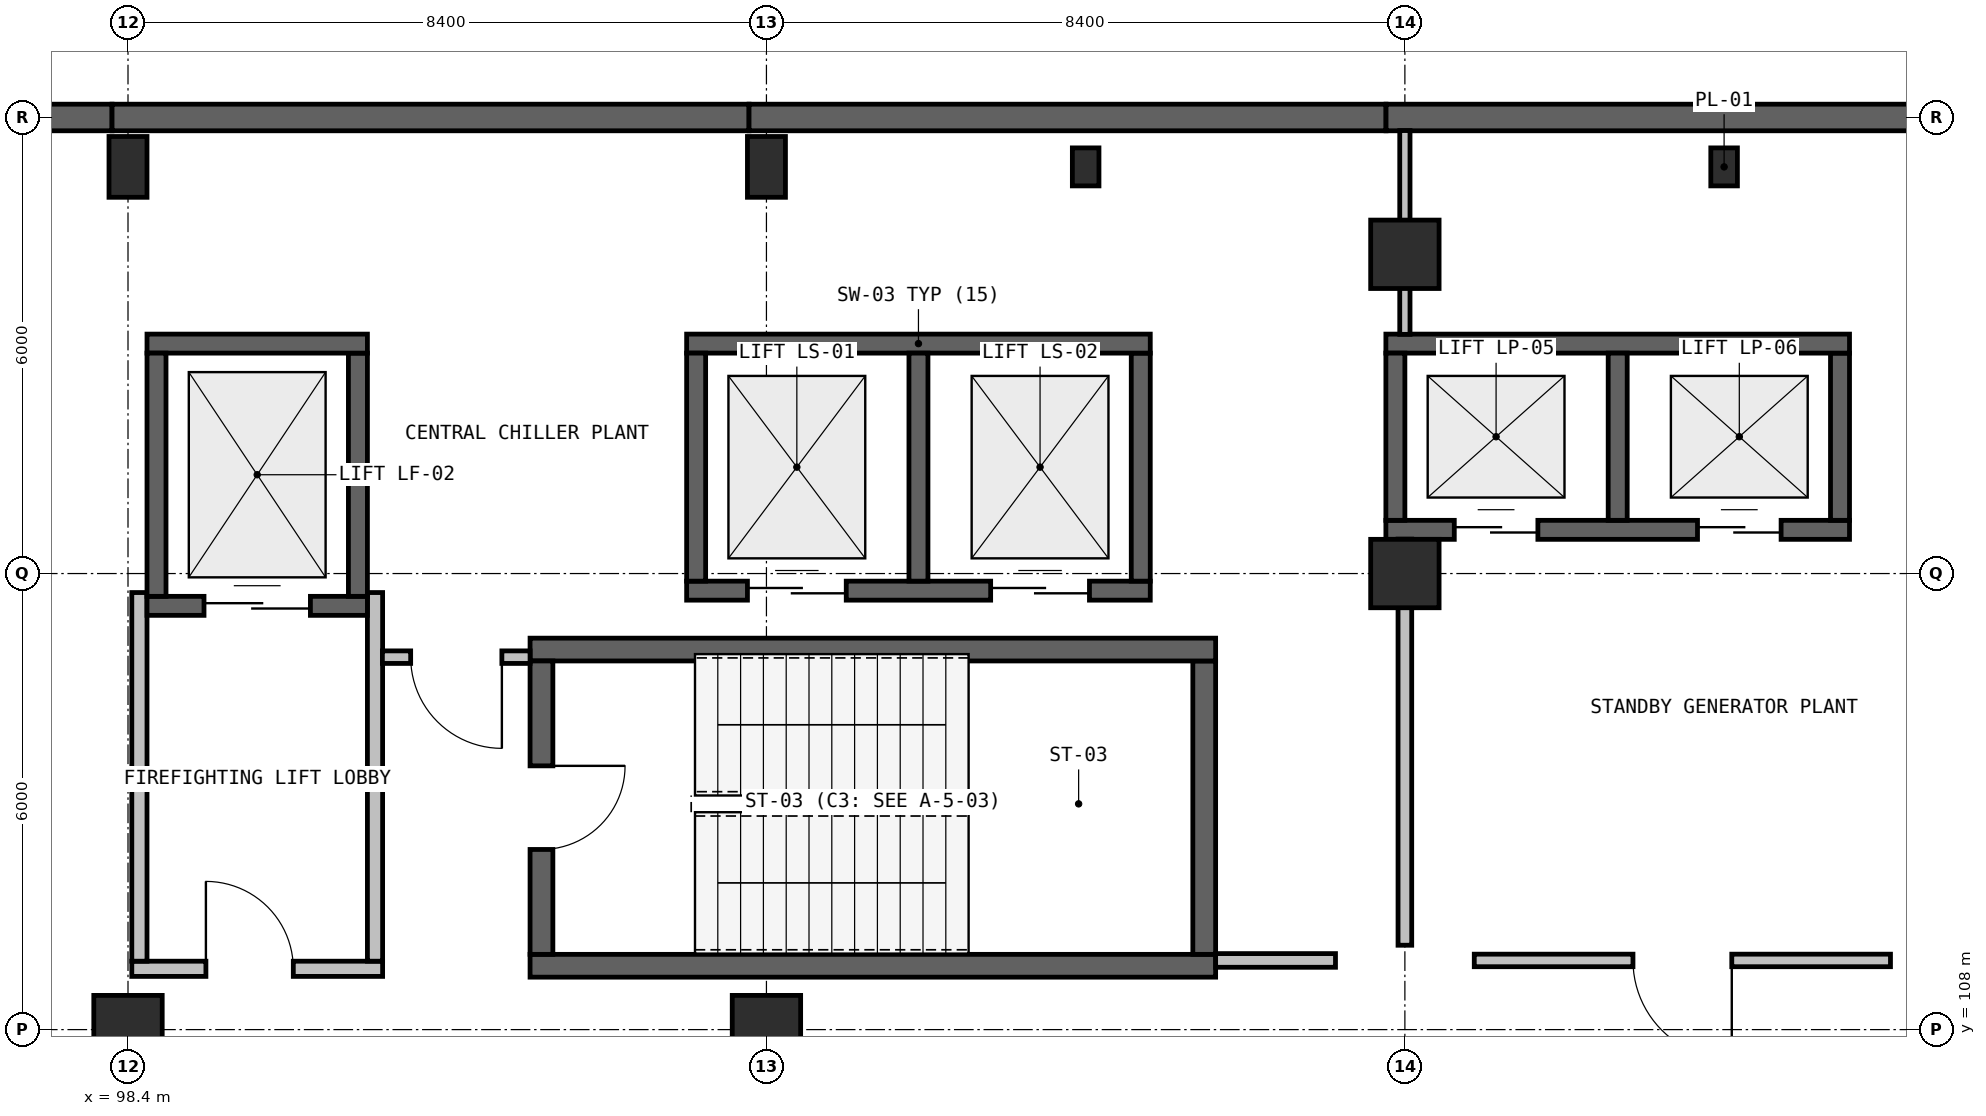
"""IFC4 building model, lengths in metres.
Left out: names, types, materials, properties, quantities, classifications, styles, units other than length and angle.
Written with IfcOpenShell. Run it as: python <this file> out.ifc"""

import sys

from ifc_helpers import new_model, si_unit, direction, frame, frame_2d, origin, origin_2d, place, context, subcontext, project, spatial, rectangle, extrude, element, fill, save


model = new_model("IFC4")
c1 = context("Model", 3, precision=1e-05, world=origin(), true_north=direction((0.0, 1.0)))
c2 = subcontext(c1, "Body", "Model", "MODEL_VIEW")
j1 = project(units=[si_unit("LENGTHUNIT", "METRE"), si_unit("PLANEANGLEUNIT", "RADIAN")], contexts=[c1])
p1 = place(None, origin())
s1 = spatial("IfcSite", under=j1, at=p1, CompositionType="ELEMENT")
p2 = place(p1, origin())
s2 = spatial("IfcBuilding", under=s1, at=p2, CompositionType="ELEMENT")
p3 = place(p2, frame((0.0, 0.0, -4.8)))
s3 = spatial("IfcBuildingStorey", under=s2, at=p3, CompositionType="ELEMENT", Elevation=-4.8)
for number, where, z_axis, x_axis in (
    (1, (115.2, 118.2, 0.0), (0.0, 0.0, 1.0), (1.0, 0.0, 0.0)),
    (2, (98.4, 108.0, 0.0), (0.0, 0.0, 1.0), (1.0, 0.0, 0.0)),
):
    element("IfcColumn", number, at=place(p3, frame(where, z_axis=z_axis, x_axis=x_axis)), inside=s3, PredefinedType="COLUMN", context=c2, shape_type="SweptSolid", body=[
        extrude(rectangle(XDim=0.9, YDim=0.9, at=origin_2d()), origin(), (0.0, 0.0, 1.0), 4.8),
    ])
p4 = place(p3, frame((98.4, 119.35, 0.0), z_axis=(0.0, 0.0, 1.0), x_axis=(1.0, 0.0, 0.0)))
e3 = element("IfcColumn", 3, at=p4, inside=s3, PredefinedType="COLUMN", context=c2, shape_type="SweptSolid", body=[
    extrude(rectangle(XDim=0.5, YDim=0.8, at=origin_2d()), origin(), (0.0, 0.0, 1.0), 4.8),
])
p5 = place(p3, frame((106.8, 108.0, 0.0), z_axis=(0.0, 0.0, 1.0), x_axis=(1.0, 0.0, 0.0)))
e4 = element("IfcColumn", 4, at=p5, inside=s3, PredefinedType="COLUMN", context=c2, shape_type="SweptSolid", body=[
    extrude(rectangle(XDim=0.9, YDim=0.9, at=origin_2d()), origin(), (0.0, 0.0, 1.0), 4.8),
])
p6 = place(p3, frame((106.8, 119.35, 0.0), z_axis=(0.0, 0.0, 1.0), x_axis=(1.0, 0.0, 0.0)))
e5 = element("IfcColumn", 5, at=p6, inside=s3, PredefinedType="COLUMN", context=c2, shape_type="SweptSolid", body=[
    extrude(rectangle(XDim=0.5, YDim=0.8, at=origin_2d()), origin(), (0.0, 0.0, 1.0), 4.8),
])
p7 = place(p3, frame((115.2, 114.0, 0.0), z_axis=(0.0, 0.0, 1.0), x_axis=(1.0, 0.0, 0.0)))
e6 = element("IfcColumn", 6, at=p7, inside=s3, PredefinedType="COLUMN", context=c2, shape_type="SweptSolid", body=[
    extrude(rectangle(XDim=0.9, YDim=0.9, at=origin_2d()), origin(), (0.0, 0.0, 1.0), 4.8),
])
for number, where, z_axis, x_axis in (
    (7, (111.0, 119.35, 0.0), (0.0, 0.0, 1.0), (1.0, 0.0, 0.0)),
    (8, (119.4, 119.35, 0.0), (0.0, 0.0, 1.0), (1.0, 0.0, 0.0)),
):
    element("IfcColumn", number, at=place(p3, frame(where, z_axis=z_axis, x_axis=x_axis)), inside=s3, PredefinedType="PILASTER", context=c2, shape_type="SweptSolid", body=[
        extrude(rectangle(XDim=0.35, YDim=0.5, at=origin_2d()), origin(), (0.0, 0.0, 1.0), 4.8),
    ])
p8 = place(p3, frame((89.809, 119.999, 0.0), z_axis=(0.0, 0.0, 1.0), x_axis=(0.999999993211, 0.000116522954, 0.0)))
e9 = element("IfcWall", 9, at=p8, inside=s3, PredefinedType="SHEAR", context=c2, shape_type="SweptSolid", body=[
    extrude(rectangle(XDim=8.381, YDim=0.35, at=frame_2d((4.19, 0.0))), origin(), (0.0, 0.0, 1.0), 4.45),
])
p9 = place(p3, frame((98.19, 120.0, 0.0), z_axis=(0.0, 0.0, 1.0), x_axis=(1.0, 0.0, 0.0)))
e10 = element("IfcWall", 10, at=p9, inside=s3, PredefinedType="SHEAR", context=c2, shape_type="SweptSolid", body=[
    extrude(rectangle(XDim=8.381, YDim=0.35, at=frame_2d((4.19, 0.0))), origin(), (0.0, 0.0, 1.0), 4.45),
])
p10 = place(p3, frame((106.571, 120.0, 0.0), z_axis=(0.0, 0.0, 1.0), x_axis=(1.0, 0.0, 0.0)))
e11 = element("IfcWall", 11, at=p10, inside=s3, PredefinedType="SHEAR", context=c2, shape_type="SweptSolid", body=[
    extrude(rectangle(XDim=8.381, YDim=0.35, at=frame_2d((4.19, 0.0))), origin(), (0.0, 0.0, 1.0), 4.45),
])
p11 = place(p3, frame((114.952, 120.0, 0.0), z_axis=(0.0, 0.0, 1.0), x_axis=(1.0, 0.0, 0.0)))
e12 = element("IfcWall", 12, at=p11, inside=s3, PredefinedType="SHEAR", context=c2, shape_type="SweptSolid", body=[
    extrude(rectangle(XDim=8.381, YDim=0.35, at=frame_2d((4.19, 0.0))), origin(), (0.0, 0.0, 1.0), 4.45),
])
p12 = place(p3, frame((98.45, 108.8, 0.0), z_axis=(0.0, 0.0, 1.0), x_axis=(1.0, 0.0, 0.0)))
e13 = element("IfcWall", 13, at=p12, inside=s3, PredefinedType="SOLIDWALL", context=c2, shape_type="SweptSolid", body=[
    extrude(rectangle(XDim=3.3, YDim=0.2, at=frame_2d((1.65, 0.0))), origin(), (0.0, 0.0, 1.0), 4.45),
])
p13 = place(p12, frame((0.975, 0.0, 0.0)))
e14 = element("IfcOpeningElement", 14, at=p13, cuts=e13, PredefinedType="OPENING", context=c2, shape_type="SweptSolid", body=[
    extrude(rectangle(XDim=1.15, YDim=2.15, at=frame_2d((0.575, 1.075))), frame((0.0, 0.11, 0.0), z_axis=(0.0, -1.0, 0.0), x_axis=(1.0, 0.0, 0.0)), (0.0, 0.0, 1.0), 0.22),
])
p14 = place(p3, frame((101.65, 108.9, 0.0), z_axis=(0.0, 0.0, 1.0), x_axis=(0.0, 1.0, 0.0)))
e15 = element("IfcWall", 15, at=p14, inside=s3, PredefinedType="SOLIDWALL", context=c2, shape_type="SweptSolid", body=[
    extrude(rectangle(XDim=4.85, YDim=0.2, at=frame_2d((2.425, 0.0))), origin(), (0.0, 0.0, 1.0), 4.45),
])
p15 = place(p3, frame((98.55, 113.75, 0.0), z_axis=(0.0, 0.0, 1.0), x_axis=(0.0, -1.0, 0.0)))
e16 = element("IfcWall", 16, at=p15, inside=s3, PredefinedType="SOLIDWALL", context=c2, shape_type="SweptSolid", body=[
    extrude(rectangle(XDim=4.85, YDim=0.2, at=frame_2d((2.425, 0.0))), origin(), (0.0, 0.0, 1.0), 3.7),
])
p16 = place(p3, frame((103.69, 108.84, 0.0), z_axis=(0.0, 0.0, 1.0), x_axis=(1.0, 0.0, 0.0)))
e17 = element("IfcWall", 17, at=p16, inside=s3, PredefinedType="SHEAR", context=c2, shape_type="SweptSolid", body=[
    extrude(rectangle(XDim=9.02, YDim=0.3, at=frame_2d((4.51, 0.0))), origin(), (0.0, 0.0, 1.0), 4.45),
])
p17 = place(p3, frame((112.56, 108.99, 0.0), z_axis=(0.0, 0.0, 1.0), x_axis=(0.0, 1.0, 0.0)))
e18 = element("IfcWall", 18, at=p17, inside=s3, PredefinedType="SHEAR", context=c2, shape_type="SweptSolid", body=[
    extrude(rectangle(XDim=3.86, YDim=0.3, at=frame_2d((1.93, 0.0))), origin(), (0.0, 0.0, 1.0), 4.45),
])
p18 = place(p3, frame((112.71, 113.0, 0.0), z_axis=(0.0, 0.0, 1.0), x_axis=(-1.0, 0.0, 0.0)))
e19 = element("IfcWall", 19, at=p18, inside=s3, PredefinedType="SHEAR", context=c2, shape_type="SweptSolid", body=[
    extrude(rectangle(XDim=9.02, YDim=0.3, at=frame_2d((4.51, 0.0))), origin(), (0.0, 0.0, 1.0), 4.45),
])
p19 = place(p3, frame((103.84, 112.85, 0.0), z_axis=(0.0, 0.0, 1.0), x_axis=(0.0, -1.0, 0.0)))
e20 = element("IfcWall", 20, at=p19, inside=s3, PredefinedType="SHEAR", context=c2, shape_type="SweptSolid", body=[
    extrude(rectangle(XDim=3.86, YDim=0.3, at=frame_2d((1.93, 0.0))), origin(), (0.0, 0.0, 1.0), 4.45),
])
p20 = place(p19, frame((1.38, 0.0, 0.0)))
e21 = element("IfcOpeningElement", 21, at=p20, cuts=e20, PredefinedType="OPENING", context=c2, shape_type="SweptSolid", body=[
    extrude(rectangle(XDim=1.1, YDim=2.15, at=frame_2d((0.55, 1.075))), frame((0.0, 0.16, 0.0), z_axis=(0.0, -1.0, 0.0), x_axis=(1.0, 0.0, 0.0)), (0.0, 0.0, 1.0), 0.32),
])
p21 = place(p3, frame((98.65, 113.575, 0.0), z_axis=(0.0, 0.0, 1.0), x_axis=(1.0, 0.0, 0.0)))
e22 = element("IfcWall", 22, at=p21, inside=s3, PredefinedType="SHEAR", context=c2, shape_type="SweptSolid", body=[
    extrude(rectangle(XDim=2.9, YDim=0.25, at=frame_2d((1.45, 0.0))), origin(), (0.0, 0.0, 1.0), 4.45),
])
p22 = place(p21, frame((0.75, 0.0, 0.0)))
e23 = element("IfcOpeningElement", 23, at=p22, cuts=e22, PredefinedType="OPENING", context=c2, shape_type="SweptSolid", body=[
    extrude(rectangle(XDim=1.4, YDim=2.15, at=frame_2d((0.7, 1.075))), frame((0.0, 0.135, 0.0), z_axis=(0.0, -1.0, 0.0), x_axis=(1.0, 0.0, 0.0)), (0.0, 0.0, 1.0), 0.27),
])
p23 = place(p3, frame((101.425, 113.7, 0.0), z_axis=(0.0, 0.0, 1.0), x_axis=(0.0, 1.0, 0.0)))
e24 = element("IfcWall", 24, at=p23, inside=s3, PredefinedType="SHEAR", context=c2, shape_type="SweptSolid", body=[
    extrude(rectangle(XDim=3.2, YDim=0.25, at=frame_2d((1.6, 0.0))), origin(), (0.0, 0.0, 1.0), 4.45),
])
p24 = place(p3, frame((101.55, 117.025, 0.0), z_axis=(0.0, 0.0, 1.0), x_axis=(-1.0, 0.0, 0.0)))
e25 = element("IfcWall", 25, at=p24, inside=s3, PredefinedType="SHEAR", context=c2, shape_type="SweptSolid", body=[
    extrude(rectangle(XDim=2.9, YDim=0.25, at=frame_2d((1.45, 0.0))), origin(), (0.0, 0.0, 1.0), 4.45),
])
p25 = place(p3, frame((98.775, 116.9, 0.0), z_axis=(0.0, 0.0, 1.0), x_axis=(0.0, -1.0, 0.0)))
e26 = element("IfcWall", 26, at=p25, inside=s3, PredefinedType="SHEAR", context=c2, shape_type="SweptSolid", body=[
    extrude(rectangle(XDim=3.2, YDim=0.25, at=frame_2d((1.6, 0.0))), origin(), (0.0, 0.0, 1.0), 4.45),
])
p26 = place(p3, frame((105.75, 113.775, 0.0), z_axis=(0.0, 0.0, 1.0), x_axis=(1.0, 0.0, 0.0)))
e27 = element("IfcWall", 27, at=p26, inside=s3, PredefinedType="SHEAR", context=c2, shape_type="SweptSolid", body=[
    extrude(rectangle(XDim=6.1, YDim=0.25, at=frame_2d((3.05, 0.0))), origin(), (0.0, 0.0, 1.0), 4.45),
])
p27 = place(p26, frame((0.8, 0.0, 0.0)))
e28 = element("IfcOpeningElement", 28, at=p27, cuts=e27, PredefinedType="OPENING", context=c2, shape_type="SweptSolid", body=[
    extrude(rectangle(XDim=1.3, YDim=2.15, at=frame_2d((0.65, 1.075))), frame((0.0, 0.135, 0.0), z_axis=(0.0, -1.0, 0.0), x_axis=(1.0, 0.0, 0.0)), (0.0, 0.0, 1.0), 0.27),
])
p28 = place(p26, frame((4.0, 0.0, 0.0)))
e29 = element("IfcOpeningElement", 29, at=p28, cuts=e27, PredefinedType="OPENING", context=c2, shape_type="SweptSolid", body=[
    extrude(rectangle(XDim=1.3, YDim=2.15, at=frame_2d((0.65, 1.075))), frame((0.0, 0.135, 0.0), z_axis=(0.0, -1.0, 0.0), x_axis=(1.0, 0.0, 0.0)), (0.0, 0.0, 1.0), 0.27),
])
p29 = place(p3, frame((111.725, 113.9, 0.0), z_axis=(0.0, 0.0, 1.0), x_axis=(0.0, 1.0, 0.0)))
e30 = element("IfcWall", 30, at=p29, inside=s3, PredefinedType="SHEAR", context=c2, shape_type="SweptSolid", body=[
    extrude(rectangle(XDim=3.0, YDim=0.25, at=frame_2d((1.5, 0.0))), origin(), (0.0, 0.0, 1.0), 4.45),
])
p30 = place(p3, frame((111.85, 117.025, 0.0), z_axis=(0.0, 0.0, 1.0), x_axis=(-1.0, 0.0, 0.0)))
e31 = element("IfcWall", 31, at=p30, inside=s3, PredefinedType="SHEAR", context=c2, shape_type="SweptSolid", body=[
    extrude(rectangle(XDim=6.1, YDim=0.25, at=frame_2d((3.05, 0.0))), origin(), (0.0, 0.0, 1.0), 4.45),
])
for number, where, z_axis, x_axis in (
    (32, (105.875, 116.9, 0.0), (0.0, 0.0, 1.0), (0.0, -1.0, 0.0)),
    (33, (108.8, 113.9, 0.0), (0.0, 0.0, 1.0), (0.0, 1.0, 0.0)),
):
    element("IfcWall", number, at=place(p3, frame(where, z_axis=z_axis, x_axis=x_axis)), inside=s3, PredefinedType="SHEAR", context=c2, shape_type="SweptSolid", body=[
        extrude(rectangle(XDim=3.0, YDim=0.25, at=frame_2d((1.5, 0.0))), origin(), (0.0, 0.0, 1.0), 4.45),
    ])
p31 = place(p3, frame((114.95, 114.575, 0.0), z_axis=(0.0, 0.0, 1.0), x_axis=(1.0, 0.0, 0.0)))
e34 = element("IfcWall", 34, at=p31, inside=s3, PredefinedType="SHEAR", context=c2, shape_type="SweptSolid", body=[
    extrude(rectangle(XDim=6.1, YDim=0.25, at=frame_2d((3.05, 0.0))), origin(), (0.0, 0.0, 1.0), 4.45),
])
p32 = place(p31, frame((0.9, 0.0, 0.0)))
e35 = element("IfcOpeningElement", 35, at=p32, cuts=e34, PredefinedType="OPENING", context=c2, shape_type="SweptSolid", body=[
    extrude(rectangle(XDim=1.1, YDim=2.15, at=frame_2d((0.55, 1.075))), frame((0.0, 0.135, 0.0), z_axis=(0.0, -1.0, 0.0), x_axis=(1.0, 0.0, 0.0)), (0.0, 0.0, 1.0), 0.27),
])
p33 = place(p31, frame((4.1, 0.0, 0.0)))
e36 = element("IfcOpeningElement", 36, at=p33, cuts=e34, PredefinedType="OPENING", context=c2, shape_type="SweptSolid", body=[
    extrude(rectangle(XDim=1.1, YDim=2.15, at=frame_2d((0.55, 1.075))), frame((0.0, 0.135, 0.0), z_axis=(0.0, -1.0, 0.0), x_axis=(1.0, 0.0, 0.0)), (0.0, 0.0, 1.0), 0.27),
])
p34 = place(p3, frame((120.925, 114.7, 0.0), z_axis=(0.0, 0.0, 1.0), x_axis=(0.0, 1.0, 0.0)))
e37 = element("IfcWall", 37, at=p34, inside=s3, PredefinedType="SHEAR", context=c2, shape_type="SweptSolid", body=[
    extrude(rectangle(XDim=2.2, YDim=0.25, at=frame_2d((1.1, 0.0))), origin(), (0.0, 0.0, 1.0), 4.45),
])
p35 = place(p3, frame((121.05, 117.025, 0.0), z_axis=(0.0, 0.0, 1.0), x_axis=(-1.0, 0.0, 0.0)))
e38 = element("IfcWall", 38, at=p35, inside=s3, PredefinedType="SHEAR", context=c2, shape_type="SweptSolid", body=[
    extrude(rectangle(XDim=6.1, YDim=0.25, at=frame_2d((3.05, 0.0))), origin(), (0.0, 0.0, 1.0), 4.45),
])
for number, where, z_axis, x_axis in (
    (39, (115.075, 116.9, 0.0), (0.0, 0.0, 1.0), (0.0, -1.0, 0.0)),
    (40, (118.0, 114.7, 0.0), (0.0, 0.0, 1.0), (0.0, 1.0, 0.0)),
):
    element("IfcWall", number, at=place(p3, frame(where, z_axis=z_axis, x_axis=x_axis)), inside=s3, PredefinedType="SHEAR", context=c2, shape_type="SweptSolid", body=[
        extrude(rectangle(XDim=2.2, YDim=0.25, at=frame_2d((1.1, 0.0))), origin(), (0.0, 0.0, 1.0), 4.45),
    ])
p36 = place(p3, frame((114.287, 108.91, 0.0), z_axis=(0.0, 0.0, 1.0), x_axis=(-1.0, 0.0, 0.0)))
e41 = element("IfcWall", 41, at=p36, inside=s3, PredefinedType="PARTITIONING", context=c2, shape_type="SweptSolid", body=[
    extrude(rectangle(XDim=1.577, YDim=0.18, at=frame_2d((0.789, 0.0))), origin(), (0.0, 0.0, 1.0), 4.45),
])
p37 = place(p3, frame((103.69, 112.9, 0.0), z_axis=(0.0, 0.0, 1.0), x_axis=(-1.0, 0.0, 0.0)))
e42 = element("IfcWall", 42, at=p37, inside=s3, PredefinedType="PARTITIONING", context=c2, shape_type="SweptSolid", body=[
    extrude(rectangle(XDim=1.943, YDim=0.165, at=frame_2d((0.971, 0.0))), origin(), (0.0, 0.0, 1.0), 4.45),
])
p38 = place(p37, frame((0.371, 0.0, 0.0)))
e43 = element("IfcOpeningElement", 43, at=p38, cuts=e42, PredefinedType="OPENING", context=c2, shape_type="SweptSolid", body=[
    extrude(rectangle(XDim=1.2, YDim=2.15, at=frame_2d((0.6, 1.075))), frame((0.0, 0.093, 0.0), z_axis=(0.0, -1.0, 0.0), x_axis=(1.0, 0.0, 0.0)), (0.0, 0.0, 1.0), 0.185),
])
p39 = place(p3, frame((115.2, 119.828, 0.0), z_axis=(0.0, 0.0, 1.0), x_axis=(0.0, -1.0, 0.0)))
e44 = element("IfcWall", 44, at=p39, inside=s3, PredefinedType="PARTITIONING", context=c2, shape_type="SweptSolid", body=[
    extrude(rectangle(XDim=2.681, YDim=0.135, at=frame_2d((1.34, 0.0))), origin(), (0.0, 0.0, 1.0), 4.45),
])
p40 = place(p3, frame((115.2, 114.453, 0.0), z_axis=(0.0, 0.0, 1.0), x_axis=(0.0, -1.0, 0.0)))
e45 = element("IfcWall", 45, at=p40, inside=s3, PredefinedType="PARTITIONING", context=c2, shape_type="SweptSolid", body=[
    extrude(rectangle(XDim=5.343, YDim=0.18, at=frame_2d((2.671, 0.0))), origin(), (0.0, 0.0, 1.0), 3.7),
])
p41 = place(p3, frame((121.589, 108.91, 0.0), z_axis=(0.0, 0.0, 1.0), x_axis=(-1.0, 0.0, 0.0)))
e46 = element("IfcWall", 46, at=p41, inside=s3, PredefinedType="PARTITIONING", context=c2, shape_type="SweptSolid", body=[
    extrude(rectangle(XDim=5.476, YDim=0.165, at=frame_2d((2.738, 0.0))), origin(), (0.0, 0.0, 1.0), 4.45),
])
p42 = place(p41, frame((2.088, 0.0, 0.0)))
e47 = element("IfcOpeningElement", 47, at=p42, cuts=e46, PredefinedType="OPENING", context=c2, shape_type="SweptSolid", body=[
    extrude(rectangle(XDim=1.3, YDim=2.15, at=frame_2d((0.65, 1.075))), frame((0.0, 0.093, 0.0), z_axis=(0.0, -1.0, 0.0), x_axis=(1.0, 0.0, 0.0)), (0.0, 0.0, 1.0), 0.185),
])
p43 = place(p13, origin())
e48 = element("IfcDoor", 48, at=p43, inside=s3, OperationType="SINGLE_SWING_LEFT", PredefinedType="DOOR", context=c2, shape_type="SweptSolid", body=[
    extrude(rectangle(XDim=1.15, YDim=2.15, at=frame_2d((0.575, 1.075))), frame((0.0, 0.025, 0.0), z_axis=(0.0, -1.0, 0.0), x_axis=(1.0, 0.0, 0.0)), (0.0, 0.0, 1.0), 0.05),
])
fill(e14, e48)
p44 = place(p20, origin())
e49 = element("IfcDoor", 49, at=p44, inside=s3, OperationType="SINGLE_SWING_LEFT", PredefinedType="DOOR", context=c2, shape_type="SweptSolid", body=[
    extrude(rectangle(XDim=1.1, YDim=2.15, at=frame_2d((0.55, 1.075))), frame((0.0, 0.025, 0.0), z_axis=(0.0, -1.0, 0.0), x_axis=(1.0, 0.0, 0.0)), (0.0, 0.0, 1.0), 0.05),
])
fill(e21, e49)
p45 = place(p22, origin())
e50 = element("IfcDoor", 50, at=p45, inside=s3, OperationType="DOUBLE_DOOR_SLIDING", PredefinedType="DOOR", context=c2, shape_type="SweptSolid", body=[
    extrude(rectangle(XDim=1.4, YDim=2.15, at=frame_2d((0.7, 1.075))), frame((0.0, 0.025, 0.0), z_axis=(0.0, -1.0, 0.0), x_axis=(1.0, 0.0, 0.0)), (0.0, 0.0, 1.0), 0.05),
])
fill(e23, e50)
p46 = place(p27, origin())
e51 = element("IfcDoor", 51, at=p46, inside=s3, OperationType="DOUBLE_DOOR_SLIDING", PredefinedType="DOOR", context=c2, shape_type="SweptSolid", body=[
    extrude(rectangle(XDim=1.3, YDim=2.15, at=frame_2d((0.65, 1.075))), frame((0.0, 0.025, 0.0), z_axis=(0.0, -1.0, 0.0), x_axis=(1.0, 0.0, 0.0)), (0.0, 0.0, 1.0), 0.05),
])
fill(e28, e51)
p47 = place(p28, origin())
e52 = element("IfcDoor", 52, at=p47, inside=s3, OperationType="DOUBLE_DOOR_SLIDING", PredefinedType="DOOR", context=c2, shape_type="SweptSolid", body=[
    extrude(rectangle(XDim=1.3, YDim=2.15, at=frame_2d((0.65, 1.075))), frame((0.0, 0.025, 0.0), z_axis=(0.0, -1.0, 0.0), x_axis=(1.0, 0.0, 0.0)), (0.0, 0.0, 1.0), 0.05),
])
fill(e29, e52)
p48 = place(p32, origin())
e53 = element("IfcDoor", 53, at=p48, inside=s3, OperationType="DOUBLE_DOOR_SLIDING", PredefinedType="DOOR", context=c2, shape_type="SweptSolid", body=[
    extrude(rectangle(XDim=1.1, YDim=2.15, at=frame_2d((0.55, 1.075))), frame((0.0, 0.025, 0.0), z_axis=(0.0, -1.0, 0.0), x_axis=(1.0, 0.0, 0.0)), (0.0, 0.0, 1.0), 0.05),
])
fill(e35, e53)
p49 = place(p33, origin())
e54 = element("IfcDoor", 54, at=p49, inside=s3, OperationType="DOUBLE_DOOR_SLIDING", PredefinedType="DOOR", context=c2, shape_type="SweptSolid", body=[
    extrude(rectangle(XDim=1.1, YDim=2.15, at=frame_2d((0.55, 1.075))), frame((0.0, 0.025, 0.0), z_axis=(0.0, -1.0, 0.0), x_axis=(1.0, 0.0, 0.0)), (0.0, 0.0, 1.0), 0.05),
])
fill(e36, e54)
p50 = place(p38, origin())
e55 = element("IfcDoor", 55, at=p50, inside=s3, OperationType="SINGLE_SWING_LEFT", PredefinedType="DOOR", context=c2, shape_type="SweptSolid", body=[
    extrude(rectangle(XDim=1.2, YDim=2.15, at=frame_2d((0.6, 1.075))), frame((0.0, 0.025, 0.0), z_axis=(0.0, -1.0, 0.0), x_axis=(1.0, 0.0, 0.0)), (0.0, 0.0, 1.0), 0.05),
])
fill(e43, e55)
p51 = place(p42, origin())
e56 = element("IfcDoor", 56, at=p51, inside=s3, OperationType="SINGLE_SWING_RIGHT", PredefinedType="DOOR", context=c2, shape_type="SweptSolid", body=[
    extrude(rectangle(XDim=1.3, YDim=2.15, at=frame_2d((0.65, 1.075))), frame((0.0, 0.025, 0.0), z_axis=(0.0, -1.0, 0.0), x_axis=(1.0, 0.0, 0.0)), (0.0, 0.0, 1.0), 0.05),
])
fill(e47, e56)
save(model, sys.argv[1])
